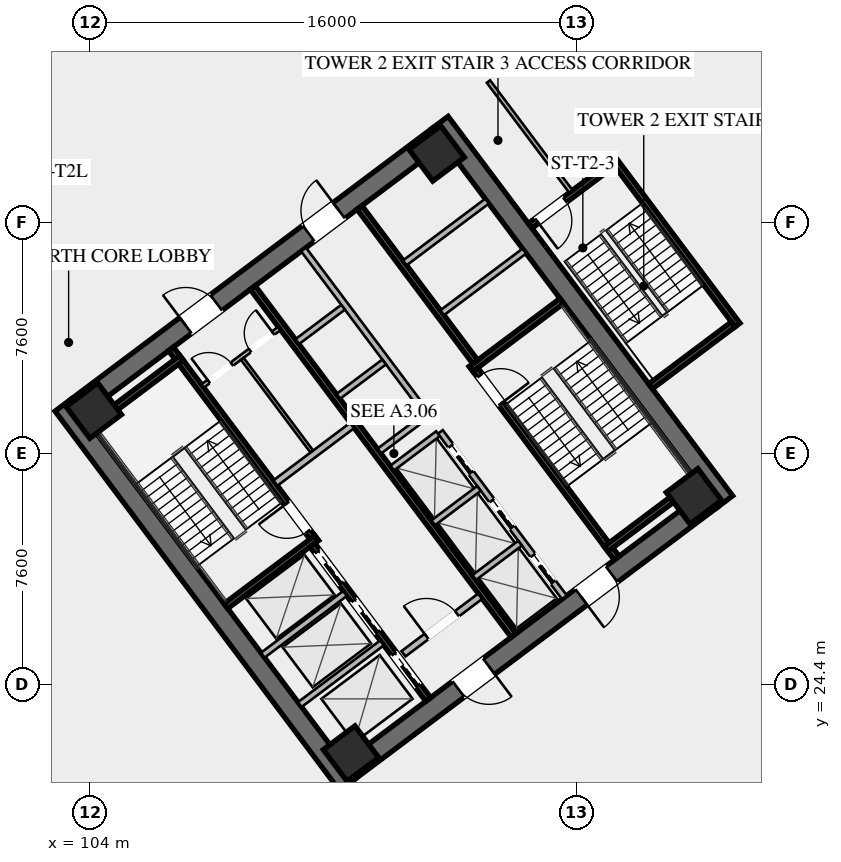
"""IFC4 building model, lengths in metres.
Left out: names, types, materials, properties, quantities, classifications, styles, units other than length and angle.
Written with IfcOpenShell. Run it as: python <this file> out.ifc"""

import sys

from ifc_helpers import new_model, si_unit, direction, frame, frame_2d, origin, origin_2d, place, context, subcontext, project, spatial, rectangle, hollow_rectangle, extrude, element, fill, save


model = new_model("IFC4")
c1 = context("Model", 3, precision=1e-05, world=origin(), true_north=direction((0.0, 1.0)))
c2 = subcontext(c1, "Body", "Model", "MODEL_VIEW")
j1 = project(units=[si_unit("LENGTHUNIT", "METRE"), si_unit("PLANEANGLEUNIT", "RADIAN")], contexts=[c1])
p1 = place(None, origin())
s1 = spatial("IfcSite", under=j1, at=p1, CompositionType="ELEMENT")
p2 = place(p1, origin())
s2 = spatial("IfcBuilding", under=s1, at=p2, CompositionType="ELEMENT")
p3 = place(p2, frame((0.0, 0.0, 5.4)))
s3 = spatial("IfcBuildingStorey", under=s2, at=p3, CompositionType="ELEMENT", Elevation=5.4)
for number, where, z_axis, x_axis in (
    (1, (112.476, 21.107, 0.0), (0.0, 0.0, 1.0), (-0.6, 0.8, 0.0)),
    (2, (115.524, 42.893, 0.0), (0.0, 0.0, 1.0), (0.6, -0.8, 0.0)),
):
    element("IfcWall", number, at=place(p3, frame(where, z_axis=z_axis, x_axis=x_axis)), inside=s3, PredefinedType="SHEAR", context=c2, shape_type="SweptSolid", body=[
        extrude(rectangle(XDim=15.6, YDim=0.65, at=frame_2d((7.8, 0.0))), origin(), (0.0, 0.0, 1.0), 4.8),
    ])
p4 = place(p3, frame((124.429, 30.478, 0.0), z_axis=(0.0, 0.0, 1.0), x_axis=(-0.799998028465, -0.600002628705, 0.0)))
e3 = element("IfcWall", 3, at=p4, inside=s3, PredefinedType="SHEAR", context=c2, shape_type="SweptSolid", body=[
    extrude(rectangle(XDim=14.86, YDim=0.65, at=frame_2d((7.43, 0.0))), origin(), (0.0, 0.0, 1.0), 4.8),
])
p5 = place(p4, frame((9.13, 0.0, 0.0)))
e4 = element("IfcOpeningElement", 4, at=p5, cuts=e3, PredefinedType="OPENING", context=c2, shape_type="SweptSolid", body=[
    extrude(rectangle(XDim=1.25, YDim=2.25, at=frame_2d((0.625, 1.125))), frame((0.0, 0.335, 0.0), z_axis=(0.0, -1.0, 0.0), x_axis=(1.0, 0.0, 0.0)), (0.0, 0.0, 1.0), 0.67),
])
p6 = place(p4, frame((4.08, 0.0, 0.0)))
e5 = element("IfcOpeningElement", 5, at=p6, cuts=e3, PredefinedType="OPENING", context=c2, shape_type="SweptSolid", body=[
    extrude(rectangle(XDim=1.25, YDim=2.25, at=frame_2d((0.625, 1.125))), frame((0.0, 0.335, 0.0), z_axis=(0.0, -1.0, 0.0), x_axis=(1.0, 0.0, 0.0)), (0.0, 0.0, 1.0), 0.67),
])
p7 = place(p3, frame((103.571, 33.522, 0.0), z_axis=(0.0, 0.0, 1.0), x_axis=(0.799998028465, 0.600002628705, 0.0)))
e6 = element("IfcWall", 6, at=p7, inside=s3, PredefinedType="SHEAR", context=c2, shape_type="SweptSolid", body=[
    extrude(rectangle(XDim=14.86, YDim=0.65, at=frame_2d((7.43, 0.0))), origin(), (0.0, 0.0, 1.0), 4.8),
])
p8 = place(p7, frame((4.48, 0.0, 0.0)))
e7 = element("IfcOpeningElement", 7, at=p8, cuts=e6, PredefinedType="OPENING", context=c2, shape_type="SweptSolid", body=[
    extrude(rectangle(XDim=1.25, YDim=2.25, at=frame_2d((0.625, 1.125))), frame((0.0, 0.335, 0.0), z_axis=(0.0, -1.0, 0.0), x_axis=(1.0, 0.0, 0.0)), (0.0, 0.0, 1.0), 0.67),
])
p9 = place(p7, frame((9.53, 0.0, 0.0)))
e8 = element("IfcOpeningElement", 8, at=p9, cuts=e6, PredefinedType="OPENING", context=c2, shape_type="SweptSolid", body=[
    extrude(rectangle(XDim=1.25, YDim=2.25, at=frame_2d((0.625, 1.125))), frame((0.0, 0.335, 0.0), z_axis=(0.0, -1.0, 0.0), x_axis=(1.0, 0.0, 0.0)), (0.0, 0.0, 1.0), 0.67),
])
for number, where, z_axis, x_axis in (
    (9, (112.59, 22.13, 0.0), (0.0, 0.0, 1.0), (0.8, 0.6, 0.0)),
    (10, (123.87, 30.59, 0.0), (0.0, 0.0, 1.0), (0.8, 0.6, 0.0)),
    (11, (115.41, 41.87, 0.0), (0.0, 0.0, 1.0), (0.8, 0.6, 0.0)),
    (12, (104.13, 33.41, 0.0), (0.0, 0.0, 1.0), (0.8, 0.6, 0.0)),
):
    element("IfcColumn", number, at=place(p3, frame(where, z_axis=z_axis, x_axis=x_axis)), inside=s3, PredefinedType="COLUMN", context=c2, shape_type="SweptSolid", body=[
        extrude(hollow_rectangle(XDim=1.3, YDim=1.3, WallThickness=0.05, at=origin_2d()), origin(), (0.0, 0.0, 1.0), 4.54),
    ])
p10 = place(p3, frame((111.44, 29.08, 0.0), z_axis=(0.0, 0.0, 1.0), x_axis=(-0.600009827119, 0.799992629566, 0.0)))
e13 = element("IfcWall", 13, at=p10, inside=s3, PredefinedType="SHEAR", context=c2, shape_type="SweptSolid", body=[
    extrude(rectangle(XDim=7.95, YDim=0.2, at=frame_2d((3.975, 0.0))), origin(), (0.0, 0.0, 1.0), 4.54),
])
p11 = place(p10, frame((0.45, 0.0, 0.0)))
e14 = element("IfcOpeningElement", 14, at=p11, cuts=e13, PredefinedType="OPENING", context=c2, shape_type="SweptSolid", body=[
    extrude(rectangle(XDim=1.15, YDim=2.2, at=frame_2d((0.575, 1.1))), frame((0.0, 0.11, 0.0), z_axis=(0.0, -1.0, 0.0), x_axis=(1.0, 0.0, 0.0)), (0.0, 0.0, 1.0), 0.22),
])
for number, where, z_axis, x_axis in (
    (15, (108.476, 26.982, 0.0), (0.0, 0.0, 1.0), (0.8, 0.6, 0.0)),
    (16, (104.036, 32.902, 0.0), (0.0, 0.0, 1.0), (0.8, 0.6, 0.0)),
):
    element("IfcWall", number, at=place(p3, frame(where, z_axis=z_axis, x_axis=x_axis)), inside=s3, PredefinedType="SHEAR", context=c2, shape_type="SweptSolid", body=[
        extrude(rectangle(XDim=3.73, YDim=0.2, at=frame_2d((1.865, 0.0))), origin(), (0.0, 0.0, 1.0), 4.54),
    ])
p12 = place(p3, frame((116.56, 34.92, 0.0), z_axis=(0.0, 0.0, 1.0), x_axis=(0.600009827119, -0.799992629566, 0.0)))
e17 = element("IfcWall", 17, at=p12, inside=s3, PredefinedType="SHEAR", context=c2, shape_type="SweptSolid", body=[
    extrude(rectangle(XDim=7.95, YDim=0.2, at=frame_2d((3.975, 0.0))), origin(), (0.0, 0.0, 1.0), 4.54),
])
p13 = place(p12, frame((0.45, 0.0, 0.0)))
e18 = element("IfcOpeningElement", 18, at=p13, cuts=e17, PredefinedType="OPENING", context=c2, shape_type="SweptSolid", body=[
    extrude(rectangle(XDim=1.15, YDim=2.2, at=frame_2d((0.575, 1.1))), frame((0.0, 0.11, 0.0), z_axis=(0.0, -1.0, 0.0), x_axis=(1.0, 0.0, 0.0)), (0.0, 0.0, 1.0), 0.22),
])
for number, where, z_axis, x_axis in (
    (19, (116.54, 34.78, 0.0), (0.0, 0.0, 1.0), (0.8, 0.6, 0.0)),
    (20, (120.98, 28.86, 0.0), (0.0, 0.0, 1.0), (0.8, 0.6, 0.0)),
):
    element("IfcWall", number, at=place(p3, frame(where, z_axis=z_axis, x_axis=x_axis)), inside=s3, PredefinedType="SHEAR", context=c2, shape_type="SweptSolid", body=[
        extrude(rectangle(XDim=3.73, YDim=0.2, at=frame_2d((1.865, 0.0))), origin(), (0.0, 0.0, 1.0), 4.54),
    ])
p14 = place(p3, frame((117.938, 26.016, 0.0), z_axis=(0.0, 0.0, 1.0), x_axis=(-0.600005463273, 0.799995902516, 0.0)))
e21 = element("IfcWall", 21, at=p14, inside=s3, PredefinedType="SHEAR", context=c2, shape_type="SweptSolid", body=[
    extrude(rectangle(XDim=14.3, YDim=0.2, at=frame_2d((7.15, 0.0))), origin(), (0.0, 0.0, 1.0), 4.54),
])
p15 = place(p3, frame((110.104, 31.028, 0.0), z_axis=(0.0, 0.0, 1.0), x_axis=(0.800018601094, 0.59997519774, 0.0)))
e22 = element("IfcWall", 22, at=p15, inside=s3, PredefinedType="SOLIDWALL", context=c2, shape_type="SweptSolid", body=[
    extrude(rectangle(XDim=3.15, YDim=0.22, at=frame_2d((1.575, 0.0))), origin(), (0.0, 0.0, 1.0), 3.583),
])
p16 = place(p3, frame((114.316, 25.412, 0.0), z_axis=(0.0, 0.0, 1.0), x_axis=(0.800018601094, 0.59997519774, 0.0)))
e23 = element("IfcWall", 23, at=p16, inside=s3, PredefinedType="SOLIDWALL", context=c2, shape_type="SweptSolid", body=[
    extrude(rectangle(XDim=3.15, YDim=0.22, at=frame_2d((1.575, 0.0))), origin(), (0.0, 0.0, 1.0), 3.583),
])
p17 = place(p16, frame((0.95, 0.0, 0.0)))
e24 = element("IfcOpeningElement", 24, at=p17, cuts=e23, PredefinedType="OPENING", context=c2, shape_type="SweptSolid", body=[
    extrude(rectangle(XDim=1.25, YDim=2.25, at=frame_2d((0.625, 1.125))), frame((0.0, 0.12, 0.0), z_axis=(0.0, -1.0, 0.0), x_axis=(1.0, 0.0, 0.0)), (0.0, 0.0, 1.0), 0.24),
])
p18 = place(p3, frame((115.13, 23.91, 0.0), z_axis=(0.0, 0.0, 1.0), x_axis=(-0.599975393228, 0.800018454488, 0.0)))
e25 = element("IfcWall", 25, at=p18, inside=s3, PredefinedType="SHEAR", context=c2, shape_type="SweptSolid", body=[
    extrude(rectangle(XDim=6.35, YDim=0.2, at=frame_2d((3.175, 0.0))), origin(), (0.0, 0.0, 1.0), 4.54),
])
p19 = place(p18, frame((4.775, 0.0, 0.0)))
e26 = element("IfcOpeningElement", 26, at=p19, cuts=e25, PredefinedType="OPENING", context=c2, shape_type="SweptSolid", body=[
    extrude(rectangle(XDim=1.3, YDim=2.25, at=frame_2d((0.65, 1.125))), frame((0.0, 0.11, 0.0), z_axis=(0.0, -1.0, 0.0), x_axis=(1.0, 0.0, 0.0)), (0.0, 0.0, 1.0), 0.22),
])
p20 = place(p18, frame((2.775, 0.0, 0.0)))
e27 = element("IfcOpeningElement", 27, at=p20, cuts=e25, PredefinedType="OPENING", context=c2, shape_type="SweptSolid", body=[
    extrude(rectangle(XDim=1.3, YDim=2.25, at=frame_2d((0.65, 1.125))), frame((0.0, 0.11, 0.0), z_axis=(0.0, -1.0, 0.0), x_axis=(1.0, 0.0, 0.0)), (0.0, 0.0, 1.0), 0.22),
])
p21 = place(p18, frame((0.575, 0.0, 0.0)))
e28 = element("IfcOpeningElement", 28, at=p21, cuts=e25, PredefinedType="OPENING", context=c2, shape_type="SweptSolid", body=[
    extrude(rectangle(XDim=1.3, YDim=2.25, at=frame_2d((0.65, 1.125))), frame((0.0, 0.11, 0.0), z_axis=(0.0, -1.0, 0.0), x_axis=(1.0, 0.0, 0.0)), (0.0, 0.0, 1.0), 0.22),
])
for number, where, z_axis, x_axis in (
    (29, (110.906, 23.742, 0.0), (0.0, 0.0, 1.0), (0.8, 0.6, 0.0)),
    (30, (109.688, 25.366, 0.0), (0.0, 0.0, 1.0), (0.8, 0.6, 0.0)),
):
    element("IfcWall", number, at=place(p3, frame(where, z_axis=z_axis, x_axis=x_axis)), inside=s3, PredefinedType="SOLIDWALL", context=c2, shape_type="SweptSolid", body=[
        extrude(rectangle(XDim=3.38, YDim=0.2, at=frame_2d((1.69, 0.0))), origin(), (0.0, 0.0, 1.0), 4.54),
    ])
p22 = place(p3, frame((112.87, 40.09, 0.0), z_axis=(0.0, 0.0, 1.0), x_axis=(0.599975393228, -0.800018454488, 0.0)))
e31 = element("IfcWall", 31, at=p22, inside=s3, PredefinedType="SHEAR", context=c2, shape_type="SweptSolid", body=[
    extrude(rectangle(XDim=6.35, YDim=0.2, at=frame_2d((3.175, 0.0))), origin(), (0.0, 0.0, 1.0), 4.54),
])
for number, where, z_axis, x_axis in (
    (32, (115.59, 36.63, 0.0), (0.0, 0.0, 1.0), (0.8, 0.6, 0.0)),
    (33, (114.36, 38.27, 0.0), (0.0, 0.0, 1.0), (0.8, 0.6, 0.0)),
):
    element("IfcWall", number, at=place(p3, frame(where, z_axis=z_axis, x_axis=x_axis)), inside=s3, PredefinedType="SOLIDWALL", context=c2, shape_type="SweptSolid", body=[
        extrude(rectangle(XDim=3.38, YDim=0.2, at=frame_2d((1.69, 0.0))), origin(), (0.0, 0.0, 1.0), 4.54),
    ])
p23 = place(p3, frame((107.71, 34.22, 0.0), z_axis=(0.0, 0.0, 1.0), x_axis=(0.799981399002, 0.60002480053, 0.0)))
e34 = element("IfcWall", 34, at=p23, inside=s3, PredefinedType="PARTITIONING", context=c2, shape_type="SweptSolid", body=[
    extrude(rectangle(XDim=3.15, YDim=0.135, at=frame_2d((1.575, 0.0))), origin(), (0.0, 0.0, 1.0), 3.583),
])
p24 = place(p23, frame((0.25, 0.0, 0.0)))
e35 = element("IfcOpeningElement", 35, at=p24, cuts=e34, PredefinedType="OPENING", context=c2, shape_type="SweptSolid", body=[
    extrude(rectangle(XDim=0.95, YDim=2.05, at=frame_2d((0.475, 1.025))), frame((0.0, 0.077, 0.0), z_axis=(0.0, -1.0, 0.0), x_axis=(1.0, 0.0, 0.0)), (0.0, 0.0, 1.0), 0.155),
])
p25 = place(p23, frame((1.95, 0.0, 0.0)))
e36 = element("IfcOpeningElement", 36, at=p25, cuts=e34, PredefinedType="OPENING", context=c2, shape_type="SweptSolid", body=[
    extrude(rectangle(XDim=0.95, YDim=2.05, at=frame_2d((0.475, 1.025))), frame((0.0, 0.077, 0.0), z_axis=(0.0, -1.0, 0.0), x_axis=(1.0, 0.0, 0.0)), (0.0, 0.0, 1.0), 0.155),
])
p26 = place(p3, frame((111.296, 32.072, 0.0), z_axis=(0.0, 0.0, 1.0), x_axis=(-0.59995887973, 0.800030838552, 0.0)))
e37 = element("IfcWall", 37, at=p26, inside=s3, PredefinedType="PARTITIONING", context=c2, shape_type="SweptSolid", body=[
    extrude(rectangle(XDim=3.8, YDim=0.11, at=frame_2d((1.9, 0.0))), origin(), (0.0, 0.0, 1.0), 3.583),
])
p27 = place(p3, frame((119.61, 27.27, 0.0), z_axis=(0.0, 0.0, 1.0), x_axis=(-0.600011488909, 0.79999138319, 0.0)))
e38 = element("IfcWall", 38, at=p27, inside=s3, PredefinedType="SOLIDWALL", context=c2, shape_type="SweptSolid", body=[
    extrude(rectangle(XDim=6.8, YDim=0.2, at=frame_2d((3.4, 0.0))), origin(), (0.0, 0.0, 1.0), 4.54),
])
p28 = place(p27, frame((0.625, 0.0, 0.0)))
e39 = element("IfcOpeningElement", 39, at=p28, cuts=e38, PredefinedType="OPENING", context=c2, shape_type="SweptSolid", body=[
    extrude(rectangle(XDim=1.1, YDim=2.2, at=frame_2d((0.55, 1.1))), frame((0.0, 0.11, 0.0), z_axis=(0.0, -1.0, 0.0), x_axis=(1.0, 0.0, 0.0)), (0.0, 0.0, 1.0), 0.22),
])
p29 = place(p27, frame((2.875, 0.0, 0.0)))
e40 = element("IfcOpeningElement", 40, at=p29, cuts=e38, PredefinedType="OPENING", context=c2, shape_type="SweptSolid", body=[
    extrude(rectangle(XDim=1.1, YDim=2.2, at=frame_2d((0.55, 1.1))), frame((0.0, 0.11, 0.0), z_axis=(0.0, -1.0, 0.0), x_axis=(1.0, 0.0, 0.0)), (0.0, 0.0, 1.0), 0.22),
])
p30 = place(p27, frame((5.125, 0.0, 0.0)))
e41 = element("IfcOpeningElement", 41, at=p30, cuts=e38, PredefinedType="OPENING", context=c2, shape_type="SweptSolid", body=[
    extrude(rectangle(XDim=1.1, YDim=2.2, at=frame_2d((0.55, 1.1))), frame((0.0, 0.11, 0.0), z_axis=(0.0, -1.0, 0.0), x_axis=(1.0, 0.0, 0.0)), (0.0, 0.0, 1.0), 0.22),
])
p31 = place(p3, frame((116.646, 27.922, 0.0), z_axis=(0.0, 0.0, 1.0), x_axis=(0.8, 0.6, 0.0)))
e42 = element("IfcWall", 42, at=p31, inside=s3, PredefinedType="SOLIDWALL", context=c2, shape_type="SweptSolid", body=[
    extrude(rectangle(XDim=1.88, YDim=0.2, at=frame_2d((0.94, 0.0))), origin(), (0.0, 0.0, 1.0), 4.54),
])
p32 = place(p3, frame((115.296, 29.722, 0.0), z_axis=(0.0, 0.0, 1.0), x_axis=(0.799984418148, 0.600020775241, 0.0)))
e43 = element("IfcWall", 43, at=p32, inside=s3, PredefinedType="SOLIDWALL", context=c2, shape_type="SweptSolid", body=[
    extrude(rectangle(XDim=1.88, YDim=0.2, at=frame_2d((0.94, 0.0))), origin(), (0.0, 0.0, 1.0), 4.54),
])
p33 = place(p3, frame((113.946, 31.522, 0.0), z_axis=(0.0, 0.0, 1.0), x_axis=(0.8, 0.6, 0.0)))
e44 = element("IfcWall", 44, at=p33, inside=s3, PredefinedType="SOLIDWALL", context=c2, shape_type="SweptSolid", body=[
    extrude(rectangle(XDim=1.88, YDim=0.2, at=frame_2d((0.94, 0.0))), origin(), (0.0, 0.0, 1.0), 4.54),
])
p34 = place(p3, frame((115.11, 33.27, 0.0), z_axis=(0.0, 0.0, 1.0), x_axis=(-0.600011488909, 0.79999138319, 0.0)))
e45 = element("IfcWall", 45, at=p34, inside=s3, PredefinedType="SOLIDWALL", context=c2, shape_type="SweptSolid", body=[
    extrude(rectangle(XDim=6.8, YDim=0.2, at=frame_2d((3.4, 0.0))), origin(), (0.0, 0.0, 1.0), 4.54),
])
p35 = place(p3, frame((113.526, 32.082, 0.0), z_axis=(0.0, 0.0, 1.0), x_axis=(0.800046745961, 0.599937666993, 0.0)))
e46 = element("IfcWall", 46, at=p35, inside=s3, PredefinedType="SOLIDWALL", context=c2, shape_type="SweptSolid", body=[
    extrude(rectangle(XDim=1.88, YDim=0.2, at=frame_2d((0.94, 0.0))), origin(), (0.0, 0.0, 1.0), 4.54),
])
p36 = place(p3, frame((112.176, 33.882, 0.0), z_axis=(0.0, 0.0, 1.0), x_axis=(0.8, 0.6, 0.0)))
e47 = element("IfcWall", 47, at=p36, inside=s3, PredefinedType="SOLIDWALL", context=c2, shape_type="SweptSolid", body=[
    extrude(rectangle(XDim=1.88, YDim=0.2, at=frame_2d((0.94, 0.0))), origin(), (0.0, 0.0, 1.0), 4.54),
])
p37 = place(p3, frame((110.826, 35.682, 0.0), z_axis=(0.0, 0.0, 1.0), x_axis=(0.799984418148, 0.600020775241, 0.0)))
e48 = element("IfcWall", 48, at=p37, inside=s3, PredefinedType="SOLIDWALL", context=c2, shape_type="SweptSolid", body=[
    extrude(rectangle(XDim=1.88, YDim=0.2, at=frame_2d((0.94, 0.0))), origin(), (0.0, 0.0, 1.0), 4.54),
])
p38 = place(p3, frame((125.304, 36.228, 0.0), z_axis=(0.0, 0.0, 1.0), x_axis=(-0.59998851072, 0.800008616831, 0.0)))
e49 = element("IfcWall", 49, at=p38, inside=s3, PredefinedType="SHEAR", context=c2, shape_type="SweptSolid", body=[
    extrude(rectangle(XDim=6.8, YDim=0.2, at=frame_2d((3.4, 0.0))), origin(), (0.0, 0.0, 1.0), 4.54),
])
p39 = place(p3, frame((121.204, 41.528, 0.0), z_axis=(0.0, 0.0, 1.0), x_axis=(-0.800017232136, -0.599977023131, 0.0)))
e50 = element("IfcWall", 50, at=p39, inside=s3, PredefinedType="SHEAR", context=c2, shape_type="SweptSolid", body=[
    extrude(rectangle(XDim=3.4, YDim=0.2, at=frame_2d((1.7, 0.0))), origin(), (0.0, 0.0, 1.0), 4.54),
])
p40 = place(p39, frame((1.975, 0.0, 0.0)))
e51 = element("IfcOpeningElement", 51, at=p40, cuts=e50, PredefinedType="OPENING", context=c2, shape_type="SweptSolid", body=[
    extrude(rectangle(XDim=1.15, YDim=2.2, at=frame_2d((0.575, 1.1))), frame((0.0, 0.11, 0.0), z_axis=(0.0, -1.0, 0.0), x_axis=(1.0, 0.0, 0.0)), (0.0, 0.0, 1.0), 0.22),
])
p41 = place(p3, frame((122.444, 34.208, 0.0), z_axis=(0.0, 0.0, 1.0), x_axis=(0.79999138319, 0.600011488909, 0.0)))
e52 = element("IfcWall", 52, at=p41, inside=s3, PredefinedType="SHEAR", context=c2, shape_type="SweptSolid", body=[
    extrude(rectangle(XDim=3.4, YDim=0.2, at=frame_2d((1.7, 0.0))), origin(), (0.0, 0.0, 1.0), 4.54),
])
p42 = place(p3, frame((119.824, 40.618, 0.0), z_axis=(0.0, 0.0, 1.0), x_axis=(-0.59999135767, 0.800006481675, 0.0)))
e53 = element("IfcWall", 53, at=p42, inside=s3, PredefinedType="PARTITIONING", context=c2, shape_type="SweptSolid", body=[
    extrude(rectangle(XDim=4.52, YDim=0.135, at=frame_2d((2.26, 0.0))), origin(), (0.0, 0.0, 1.0), 3.583),
])
p43 = place(p8, origin())
e54 = element("IfcDoor", 54, at=p43, inside=s3, OperationType="SINGLE_SWING_LEFT", PredefinedType="DOOR", context=c2, shape_type="SweptSolid", body=[
    extrude(rectangle(XDim=1.25, YDim=2.25, at=frame_2d((0.625, 1.125))), frame((0.0, 0.025, 0.0), z_axis=(0.0, -1.0, 0.0), x_axis=(1.0, 0.0, 0.0)), (0.0, 0.0, 1.0), 0.05),
])
fill(e7, e54)
p44 = place(p9, origin())
e55 = element("IfcDoor", 55, at=p44, inside=s3, OperationType="SINGLE_SWING_RIGHT", PredefinedType="DOOR", context=c2, shape_type="SweptSolid", body=[
    extrude(rectangle(XDim=1.25, YDim=2.25, at=frame_2d((0.625, 1.125))), frame((0.0, 0.025, 0.0), z_axis=(0.0, -1.0, 0.0), x_axis=(1.0, 0.0, 0.0)), (0.0, 0.0, 1.0), 0.05),
])
fill(e8, e55)
p45 = place(p5, origin())
e56 = element("IfcDoor", 56, at=p45, inside=s3, OperationType="SINGLE_SWING_LEFT", PredefinedType="DOOR", context=c2, shape_type="SweptSolid", body=[
    extrude(rectangle(XDim=1.25, YDim=2.25, at=frame_2d((0.625, 1.125))), frame((0.0, 0.025, 0.0), z_axis=(0.0, -1.0, 0.0), x_axis=(1.0, 0.0, 0.0)), (0.0, 0.0, 1.0), 0.05),
])
fill(e4, e56)
p46 = place(p6, origin())
e57 = element("IfcDoor", 57, at=p46, inside=s3, OperationType="SINGLE_SWING_RIGHT", PredefinedType="DOOR", context=c2, shape_type="SweptSolid", body=[
    extrude(rectangle(XDim=1.25, YDim=2.25, at=frame_2d((0.625, 1.125))), frame((0.0, 0.025, 0.0), z_axis=(0.0, -1.0, 0.0), x_axis=(1.0, 0.0, 0.0)), (0.0, 0.0, 1.0), 0.05),
])
fill(e5, e57)
p47 = place(p11, origin())
e58 = element("IfcDoor", 58, at=p47, inside=s3, OperationType="SINGLE_SWING_RIGHT", PredefinedType="DOOR", context=c2, shape_type="SweptSolid", body=[
    extrude(rectangle(XDim=1.15, YDim=2.2, at=frame_2d((0.575, 1.1))), frame((0.0, 0.025, 0.0), z_axis=(0.0, -1.0, 0.0), x_axis=(1.0, 0.0, 0.0)), (0.0, 0.0, 1.0), 0.05),
])
fill(e14, e58)
p48 = place(p13, origin())
e59 = element("IfcDoor", 59, at=p48, inside=s3, OperationType="SINGLE_SWING_RIGHT", PredefinedType="DOOR", context=c2, shape_type="SweptSolid", body=[
    extrude(rectangle(XDim=1.15, YDim=2.2, at=frame_2d((0.575, 1.1))), frame((0.0, 0.025, 0.0), z_axis=(0.0, -1.0, 0.0), x_axis=(1.0, 0.0, 0.0)), (0.0, 0.0, 1.0), 0.05),
])
fill(e18, e59)
p49 = place(p17, origin())
e60 = element("IfcDoor", 60, at=p49, inside=s3, OperationType="SINGLE_SWING_LEFT", PredefinedType="DOOR", context=c2, shape_type="SweptSolid", body=[
    extrude(rectangle(XDim=1.25, YDim=2.25, at=frame_2d((0.625, 1.125))), frame((0.0, 0.025, 0.0), z_axis=(0.0, -1.0, 0.0), x_axis=(1.0, 0.0, 0.0)), (0.0, 0.0, 1.0), 0.05),
])
fill(e24, e60)
p50 = place(p24, origin())
e61 = element("IfcDoor", 61, at=p50, inside=s3, OperationType="SINGLE_SWING_LEFT", PredefinedType="DOOR", context=c2, shape_type="SweptSolid", body=[
    extrude(rectangle(XDim=0.95, YDim=2.05, at=frame_2d((0.475, 1.025))), frame((0.0, 0.025, 0.0), z_axis=(0.0, -1.0, 0.0), x_axis=(1.0, 0.0, 0.0)), (0.0, 0.0, 1.0), 0.05),
])
fill(e35, e61)
p51 = place(p25, origin())
e62 = element("IfcDoor", 62, at=p51, inside=s3, OperationType="SINGLE_SWING_RIGHT", PredefinedType="DOOR", context=c2, shape_type="SweptSolid", body=[
    extrude(rectangle(XDim=0.95, YDim=2.05, at=frame_2d((0.475, 1.025))), frame((0.0, 0.025, 0.0), z_axis=(0.0, -1.0, 0.0), x_axis=(1.0, 0.0, 0.0)), (0.0, 0.0, 1.0), 0.05),
])
fill(e36, e62)
p52 = place(p40, origin())
e63 = element("IfcDoor", 63, at=p52, inside=s3, OperationType="SINGLE_SWING_RIGHT", PredefinedType="DOOR", context=c2, shape_type="SweptSolid", body=[
    extrude(rectangle(XDim=1.15, YDim=2.2, at=frame_2d((0.575, 1.1))), frame((0.0, 0.025, 0.0), z_axis=(0.0, -1.0, 0.0), x_axis=(1.0, 0.0, 0.0)), (0.0, 0.0, 1.0), 0.05),
])
fill(e51, e63)
p53 = place(p19, origin())
e64 = element("IfcDoor", 64, at=p53, inside=s3, OperationType="SLIDING_TO_LEFT", PredefinedType="DOOR", context=c2, shape_type="SweptSolid", body=[
    extrude(rectangle(XDim=1.3, YDim=2.25, at=frame_2d((0.65, 1.125))), frame((0.0, 0.025, 0.0), z_axis=(0.0, -1.0, 0.0), x_axis=(1.0, 0.0, 0.0)), (0.0, 0.0, 1.0), 0.05),
])
fill(e26, e64)
p54 = place(p20, origin())
e65 = element("IfcDoor", 65, at=p54, inside=s3, OperationType="SLIDING_TO_LEFT", PredefinedType="DOOR", context=c2, shape_type="SweptSolid", body=[
    extrude(rectangle(XDim=1.3, YDim=2.25, at=frame_2d((0.65, 1.125))), frame((0.0, 0.025, 0.0), z_axis=(0.0, -1.0, 0.0), x_axis=(1.0, 0.0, 0.0)), (0.0, 0.0, 1.0), 0.05),
])
fill(e27, e65)
p55 = place(p21, origin())
e66 = element("IfcDoor", 66, at=p55, inside=s3, OperationType="SLIDING_TO_LEFT", PredefinedType="DOOR", context=c2, shape_type="SweptSolid", body=[
    extrude(rectangle(XDim=1.3, YDim=2.25, at=frame_2d((0.65, 1.125))), frame((0.0, 0.025, 0.0), z_axis=(0.0, -1.0, 0.0), x_axis=(1.0, 0.0, 0.0)), (0.0, 0.0, 1.0), 0.05),
])
fill(e28, e66)
p56 = place(p28, origin())
e67 = element("IfcDoor", 67, at=p56, inside=s3, OperationType="SLIDING_TO_LEFT", PredefinedType="DOOR", context=c2, shape_type="SweptSolid", body=[
    extrude(rectangle(XDim=1.1, YDim=2.2, at=frame_2d((0.55, 1.1))), frame((0.0, 0.025, 0.0), z_axis=(0.0, -1.0, 0.0), x_axis=(1.0, 0.0, 0.0)), (0.0, 0.0, 1.0), 0.05),
])
fill(e39, e67)
p57 = place(p29, origin())
e68 = element("IfcDoor", 68, at=p57, inside=s3, OperationType="SLIDING_TO_LEFT", PredefinedType="DOOR", context=c2, shape_type="SweptSolid", body=[
    extrude(rectangle(XDim=1.1, YDim=2.2, at=frame_2d((0.55, 1.1))), frame((0.0, 0.025, 0.0), z_axis=(0.0, -1.0, 0.0), x_axis=(1.0, 0.0, 0.0)), (0.0, 0.0, 1.0), 0.05),
])
fill(e40, e68)
p58 = place(p30, origin())
e69 = element("IfcDoor", 69, at=p58, inside=s3, OperationType="SLIDING_TO_LEFT", PredefinedType="DOOR", context=c2, shape_type="SweptSolid", body=[
    extrude(rectangle(XDim=1.1, YDim=2.2, at=frame_2d((0.55, 1.1))), frame((0.0, 0.025, 0.0), z_axis=(0.0, -1.0, 0.0), x_axis=(1.0, 0.0, 0.0)), (0.0, 0.0, 1.0), 0.05),
])
fill(e41, e69)
save(model, sys.argv[1])
